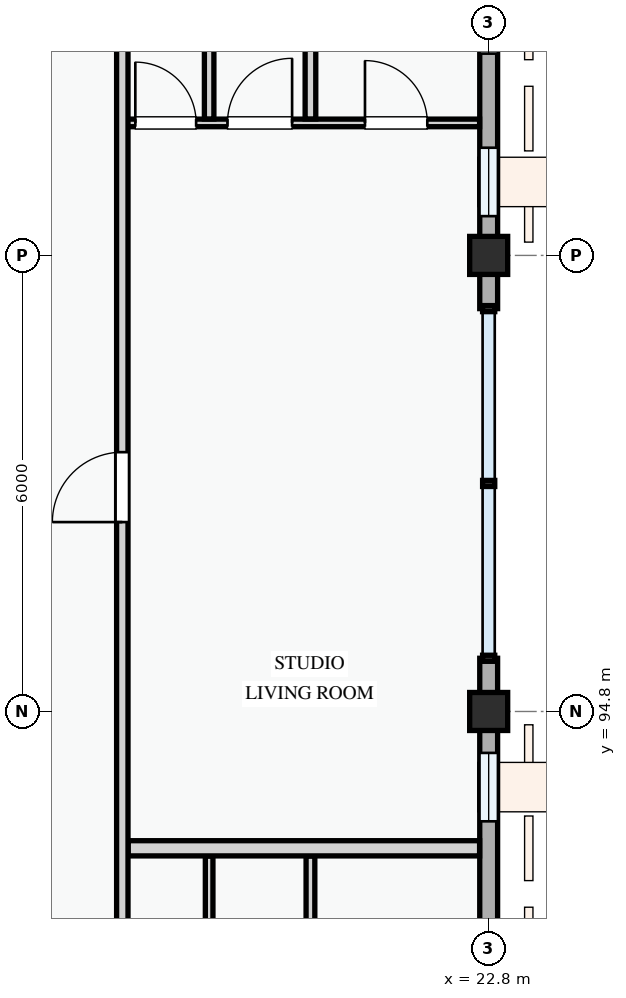
"""IFC4 building model, lengths in metres.
Left out: names, types, materials, properties, quantities, classifications, styles, units other than length and angle.
Written with IfcOpenShell. Run it as: python <this file> out.ifc"""

import sys

from ifc_helpers import new_model, si_unit, direction, frame, frame_2d, origin, origin_2d, place, context, subcontext, project, spatial, rectangle, extrude, element, fill, save


model = new_model("IFC4")
c1 = context("Model", 3, precision=1e-05, world=origin(), true_north=direction((0.0, 1.0)))
c2 = subcontext(c1, "Body", "Model", "MODEL_VIEW")
j1 = project(units=[si_unit("LENGTHUNIT", "METRE"), si_unit("PLANEANGLEUNIT", "RADIAN")], contexts=[c1])
p1 = place(None, origin())
s1 = spatial("IfcSite", under=j1, at=p1, CompositionType="ELEMENT")
p2 = place(p1, origin())
s2 = spatial("IfcBuilding", under=s1, at=p2, CompositionType="ELEMENT")
p3 = place(p2, frame((0.0, 0.0, 44.4)))
s3 = spatial("IfcBuildingStorey", under=s2, at=p3, CompositionType="ELEMENT", Elevation=44.4)
for number, where, z_axis, x_axis in (
    (1, (22.8, 94.8, 0.0), (0.0, 0.0, 1.0), (1.0, 0.0, 0.0)),
    (2, (22.8, 100.8, 0.0), (0.0, 0.0, 1.0), (1.0, 0.0, 0.0)),
):
    element("IfcColumn", number, at=place(p3, frame(where, z_axis=z_axis, x_axis=x_axis)), inside=s3, PredefinedType="COLUMN", context=c2, shape_type="SweptSolid", body=[
        extrude(rectangle(XDim=0.5, YDim=0.5, at=origin_2d()), origin(), (0.0, 0.0, 1.0), 3.3),
    ])
p4 = place(p3, frame((22.8, 86.4, 0.0), z_axis=(0.0, 0.0, 1.0), x_axis=(0.0, 1.0, 0.0)))
e3 = element("IfcWall", 3, at=p4, inside=s3, PredefinedType="STANDARD", context=c2, shape_type="SweptSolid", body=[
    extrude(rectangle(XDim=8.4, YDim=0.235, at=frame_2d((4.2, 0.0))), origin(), (0.0, 0.0, 1.0), 2.425),
])
p5 = place(p4, frame((0.604, 0.0, 0.78)))
e4 = element("IfcOpeningElement", 4, at=p5, cuts=e3, PredefinedType="OPENING", context=c2, shape_type="SweptSolid", body=[
    extrude(rectangle(XDim=2.18, YDim=1.48, at=frame_2d((1.09, 0.74))), frame((0.0, 0.127, 0.0), z_axis=(0.0, -1.0, 0.0), x_axis=(1.0, 0.0, 0.0)), (0.0, 0.0, 1.0), 0.255),
])
p6 = place(p4, frame((4.21, 0.0, 0.78)))
e5 = element("IfcOpeningElement", 5, at=p6, cuts=e3, PredefinedType="OPENING", context=c2, shape_type="SweptSolid", body=[
    extrude(rectangle(XDim=1.38, YDim=1.48, at=frame_2d((0.69, 0.74))), frame((0.0, 0.127, 0.0), z_axis=(0.0, -1.0, 0.0), x_axis=(1.0, 0.0, 0.0)), (0.0, 0.0, 1.0), 0.255),
])
p7 = place(p4, frame((6.955, 0.0, 0.78)))
e6 = element("IfcOpeningElement", 6, at=p7, cuts=e3, PredefinedType="OPENING", context=c2, shape_type="SweptSolid", body=[
    extrude(rectangle(XDim=0.9, YDim=1.2, at=frame_2d((0.45, 0.6))), frame((0.0, 0.127, 0.0), z_axis=(0.0, -1.0, 0.0), x_axis=(1.0, 0.0, 0.0)), (0.0, 0.0, 1.0), 0.255),
])
for number, where, z_axis, x_axis in (
    (7, (22.8, 94.8, 0.0), (0.0, 0.0, 1.0), (0.0, 1.0, 0.0)),
    (8, (22.8, 100.1, 0.0), (0.0, 0.0, 1.0), (0.0, 1.0, 0.0)),
):
    element("IfcWall", number, at=place(p3, frame(where, z_axis=z_axis, x_axis=x_axis)), inside=s3, PredefinedType="STANDARD", context=c2, shape_type="SweptSolid", body=[
        extrude(rectangle(XDim=0.7, YDim=0.235, at=frame_2d((0.35, 0.0))), origin(), (0.0, 0.0, 1.0), 2.575),
    ])
p8 = place(p3, frame((22.8, 100.8, 0.0), z_axis=(0.0, 0.0, 1.0), x_axis=(0.0, 1.0, 0.0)))
e9 = element("IfcWall", 9, at=p8, inside=s3, PredefinedType="STANDARD", context=c2, shape_type="SweptSolid", body=[
    extrude(rectangle(XDim=8.4, YDim=0.235, at=frame_2d((4.2, 0.0))), origin(), (0.0, 0.0, 1.0), 2.425),
])
p9 = place(p8, frame((0.517, 0.0, 0.78)))
e10 = element("IfcOpeningElement", 10, at=p9, cuts=e9, PredefinedType="OPENING", context=c2, shape_type="SweptSolid", body=[
    extrude(rectangle(XDim=0.9, YDim=1.2, at=frame_2d((0.45, 0.6))), frame((0.0, 0.127, 0.0), z_axis=(0.0, -1.0, 0.0), x_axis=(1.0, 0.0, 0.0)), (0.0, 0.0, 1.0), 0.255),
])
p10 = place(p8, frame((2.655, 0.0, 0.78)))
e11 = element("IfcOpeningElement", 11, at=p10, cuts=e9, PredefinedType="OPENING", context=c2, shape_type="SweptSolid", body=[
    extrude(rectangle(XDim=1.48, YDim=1.52, at=frame_2d((0.74, 0.76))), frame((0.0, 0.127, 0.0), z_axis=(0.0, -1.0, 0.0), x_axis=(1.0, 0.0, 0.0)), (0.0, 0.0, 1.0), 0.255),
])
p11 = place(p8, frame((5.648, 0.0, 0.78)))
e12 = element("IfcOpeningElement", 12, at=p11, cuts=e9, PredefinedType="OPENING", context=c2, shape_type="SweptSolid", body=[
    extrude(rectangle(XDim=1.82, YDim=1.46, at=frame_2d((0.91, 0.73))), frame((0.0, 0.127, 0.0), z_axis=(0.0, -1.0, 0.0), x_axis=(1.0, 0.0, 0.0)), (0.0, 0.0, 1.0), 0.255),
])
p12 = place(p3, frame((20.455, 89.664, 0.0), z_axis=(0.0, 0.0, 1.0), x_axis=(0.0, 1.0, 0.0)))
e13 = element("IfcWall", 13, at=p12, inside=s3, PredefinedType="PARTITIONING", context=c2, shape_type="SweptSolid", body=[
    extrude(rectangle(XDim=3.234, YDim=0.115, at=frame_2d((1.617, 0.0))), origin(), (0.0, 0.0, 1.0), 3.0),
])
p13 = place(p3, frame((19.122, 89.664, 0.0), z_axis=(0.0, 0.0, 1.0), x_axis=(0.0, 1.0, 0.0)))
e14 = element("IfcWall", 14, at=p13, inside=s3, PredefinedType="PARTITIONING", context=c2, shape_type="SweptSolid", body=[
    extrude(rectangle(XDim=3.234, YDim=0.1, at=frame_2d((1.617, 0.0))), origin(), (0.0, 0.0, 1.0), 3.0),
])
p14 = place(p3, frame((17.98, 102.543, 0.0), z_axis=(0.0, 0.0, 1.0), x_axis=(1.0, 0.0, 0.0)))
e15 = element("IfcWall", 15, at=p14, inside=s3, PredefinedType="PARTITIONING", context=c2, shape_type="SweptSolid", body=[
    extrude(rectangle(XDim=4.7, YDim=0.1, at=frame_2d((2.35, 0.0))), origin(), (0.0, 0.0, 1.0), 3.0),
])
p15 = place(p14, frame((0.171, 0.0, 0.0)))
e16 = element("IfcOpeningElement", 16, at=p15, cuts=e15, PredefinedType="OPENING", context=c2, shape_type="SweptSolid", body=[
    extrude(rectangle(XDim=0.8, YDim=2.1, at=frame_2d((0.4, 1.05))), frame((0.0, 0.06, 0.0), z_axis=(0.0, -1.0, 0.0), x_axis=(1.0, 0.0, 0.0)), (0.0, 0.0, 1.0), 0.12),
])
p16 = place(p14, frame((1.384, 0.0, 0.0)))
e17 = element("IfcOpeningElement", 17, at=p16, cuts=e15, PredefinedType="OPENING", context=c2, shape_type="SweptSolid", body=[
    extrude(rectangle(XDim=0.85, YDim=2.1, at=frame_2d((0.425, 1.05))), frame((0.0, 0.06, 0.0), z_axis=(0.0, -1.0, 0.0), x_axis=(1.0, 0.0, 0.0)), (0.0, 0.0, 1.0), 0.12),
])
p17 = place(p14, frame((3.193, 0.0, 0.0)))
e18 = element("IfcOpeningElement", 18, at=p17, cuts=e15, PredefinedType="OPENING", context=c2, shape_type="SweptSolid", body=[
    extrude(rectangle(XDim=0.82, YDim=2.08, at=frame_2d((0.41, 1.04))), frame((0.0, 0.06, 0.0), z_axis=(0.0, -1.0, 0.0), x_axis=(1.0, 0.0, 0.0)), (0.0, 0.0, 1.0), 0.12),
])
p18 = place(p3, frame((20.455, 102.595, 0.0), z_axis=(0.0, 0.0, 1.0), x_axis=(0.0, 1.0, 0.0)))
e19 = element("IfcWall", 19, at=p18, inside=s3, PredefinedType="PARTITIONING", context=c2, shape_type="SweptSolid", body=[
    extrude(rectangle(XDim=6.65, YDim=0.14, at=frame_2d((3.325, 0.0))), origin(), (0.0, 0.0, 1.0), 3.0),
])
p19 = place(p3, frame((19.122, 102.595, 0.0), z_axis=(0.0, 0.0, 1.0), x_axis=(0.0, 1.0, 0.0)))
e20 = element("IfcWall", 20, at=p19, inside=s3, PredefinedType="PARTITIONING", context=c2, shape_type="SweptSolid", body=[
    extrude(rectangle(XDim=6.65, YDim=0.125, at=frame_2d((3.325, 0.0))), origin(), (0.0, 0.0, 1.0), 3.0),
])
p20 = place(p3, frame((18.057, 93.0, 0.0), z_axis=(0.0, 0.0, 1.0), x_axis=(1.0, 0.0, 0.0)))
e21 = element("IfcWall", 21, at=p20, inside=s3, PredefinedType="PARTITIONING", context=c2, shape_type="SweptSolid", body=[
    extrude(rectangle(XDim=4.624, YDim=0.2, at=frame_2d((2.312, 0.0))), origin(), (0.0, 0.0, 1.0), 3.0),
])
p21 = place(p3, frame((17.98, 86.46, 0.0), z_axis=(0.0, 0.0, 1.0), x_axis=(0.0, 1.0, 0.0)))
e22 = element("IfcWall", 22, at=p21, inside=s3, PredefinedType="PARTITIONING", context=c2, shape_type="SweptSolid", body=[
    extrude(rectangle(XDim=22.88, YDim=0.15, at=frame_2d((11.44, 0.0))), origin(), (0.0, 0.0, 1.0), 3.0),
])
p22 = place(p21, frame((1.929, 0.0, 0.0)))
e23 = element("IfcOpeningElement", 23, at=p22, cuts=e22, PredefinedType="OPENING", context=c2, shape_type="SweptSolid", body=[
    extrude(rectangle(XDim=0.92, YDim=2.1, at=frame_2d((0.46, 1.05))), frame((0.0, 0.085, 0.0), z_axis=(0.0, -1.0, 0.0), x_axis=(1.0, 0.0, 0.0)), (0.0, 0.0, 1.0), 0.17),
])
p23 = place(p21, frame((10.832, 0.0, 0.0)))
e24 = element("IfcOpeningElement", 24, at=p23, cuts=e22, PredefinedType="OPENING", context=c2, shape_type="SweptSolid", body=[
    extrude(rectangle(XDim=0.92, YDim=2.1, at=frame_2d((0.46, 1.05))), frame((0.0, 0.085, 0.0), z_axis=(0.0, -1.0, 0.0), x_axis=(1.0, 0.0, 0.0)), (0.0, 0.0, 1.0), 0.17),
])
p24 = place(p7, origin())
e25 = element("IfcWindow", 25, at=p24, inside=s3, PartitioningType="SINGLE_PANEL", PredefinedType="WINDOW", context=c2, shape_type="SweptSolid", body=[
    extrude(rectangle(XDim=0.9, YDim=1.2, at=frame_2d((0.45, 0.6))), frame((0.0, 0.03, 0.0), z_axis=(0.0, -1.0, 0.0), x_axis=(1.0, 0.0, 0.0)), (0.0, 0.0, 1.0), 0.06),
])
fill(e6, e25)
p25 = place(p9, origin())
e26 = element("IfcWindow", 26, at=p25, inside=s3, PartitioningType="SINGLE_PANEL", PredefinedType="WINDOW", context=c2, shape_type="SweptSolid", body=[
    extrude(rectangle(XDim=0.9, YDim=1.2, at=frame_2d((0.45, 0.6))), frame((0.0, 0.03, 0.0), z_axis=(0.0, -1.0, 0.0), x_axis=(1.0, 0.0, 0.0)), (0.0, 0.0, 1.0), 0.06),
])
fill(e10, e26)
p26 = place(p10, origin())
e27 = element("IfcWindow", 27, at=p26, inside=s3, PartitioningType="SINGLE_PANEL", PredefinedType="WINDOW", context=c2, shape_type="SweptSolid", body=[
    extrude(rectangle(XDim=1.48, YDim=1.52, at=frame_2d((0.74, 0.76))), frame((0.0, 0.03, 0.0), z_axis=(0.0, -1.0, 0.0), x_axis=(1.0, 0.0, 0.0)), (0.0, 0.0, 1.0), 0.06),
])
fill(e11, e27)
p27 = place(p15, origin())
e28 = element("IfcDoor", 28, at=p27, inside=s3, OperationType="SINGLE_SWING_LEFT", PredefinedType="DOOR", context=c2, shape_type="SweptSolid", body=[
    extrude(rectangle(XDim=0.8, YDim=2.1, at=frame_2d((0.4, 1.05))), frame((0.0, 0.025, 0.0), z_axis=(0.0, -1.0, 0.0), x_axis=(1.0, 0.0, 0.0)), (0.0, 0.0, 1.0), 0.05),
])
fill(e16, e28)
p28 = place(p16, origin())
e29 = element("IfcDoor", 29, at=p28, inside=s3, OperationType="SINGLE_SWING_RIGHT", PredefinedType="DOOR", context=c2, shape_type="SweptSolid", body=[
    extrude(rectangle(XDim=0.85, YDim=2.1, at=frame_2d((0.425, 1.05))), frame((0.0, 0.025, 0.0), z_axis=(0.0, -1.0, 0.0), x_axis=(1.0, 0.0, 0.0)), (0.0, 0.0, 1.0), 0.05),
])
fill(e17, e29)
p29 = place(p17, origin())
e30 = element("IfcDoor", 30, at=p29, inside=s3, OperationType="SINGLE_SWING_LEFT", PredefinedType="DOOR", context=c2, shape_type="SweptSolid", body=[
    extrude(rectangle(XDim=0.82, YDim=2.08, at=frame_2d((0.41, 1.04))), frame((0.0, 0.025, 0.0), z_axis=(0.0, -1.0, 0.0), x_axis=(1.0, 0.0, 0.0)), (0.0, 0.0, 1.0), 0.05),
])
fill(e18, e30)
p30 = place(p23, origin())
e31 = element("IfcDoor", 31, at=p30, inside=s3, OperationType="SINGLE_SWING_LEFT", PredefinedType="DOOR", context=c2, shape_type="SweptSolid", body=[
    extrude(rectangle(XDim=0.92, YDim=2.1, at=frame_2d((0.46, 1.05))), frame((0.0, 0.025, 0.0), z_axis=(0.0, -1.0, 0.0), x_axis=(1.0, 0.0, 0.0)), (0.0, 0.0, 1.0), 0.05),
])
fill(e24, e31)
save(model, sys.argv[1])
